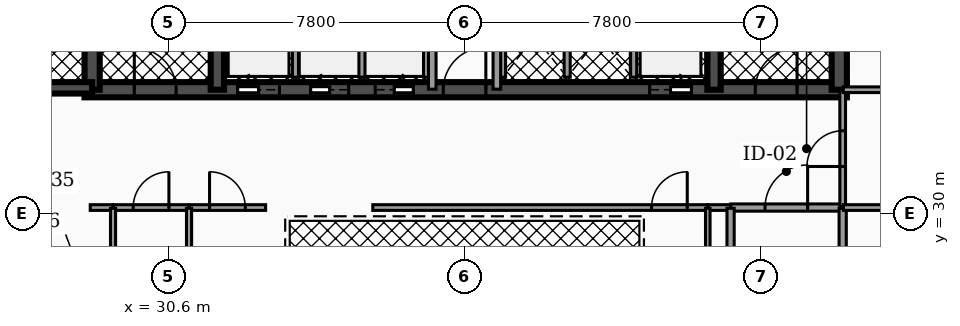
"""IFC4 building model, lengths in metres.
Left out: names, types, materials, properties, quantities, classifications, styles, units other than length and angle.
Written with IfcOpenShell. Run it as: python <this file> out.ifc"""

import sys

from ifc_helpers import new_model, si_unit, direction, frame, frame_2d, origin, place, context, subcontext, project, spatial, rectangle, extrude, element, fill, save


model = new_model("IFC4")
c1 = context("Model", 3, precision=1e-05, world=origin(), true_north=direction((0.0, 1.0)))
c2 = subcontext(c1, "Body", "Model", "MODEL_VIEW")
j1 = project(units=[si_unit("LENGTHUNIT", "METRE"), si_unit("PLANEANGLEUNIT", "RADIAN")], contexts=[c1])
p1 = place(None, origin())
s1 = spatial("IfcSite", under=j1, at=p1, CompositionType="ELEMENT")
p2 = place(p1, origin())
s2 = spatial("IfcBuilding", under=s1, at=p2, CompositionType="ELEMENT")
p3 = place(p2, frame((0.0, 0.0, 179.52)))
s3 = spatial("IfcBuildingStorey", under=s2, at=p3, CompositionType="ELEMENT", Elevation=179.52)
p4 = place(p3, frame((28.4, 33.25, 0.0), z_axis=(0.0, 0.0, 1.0), x_axis=(1.0, 0.0, 0.0)))
e1 = element("IfcWall", 1, at=p4, inside=s3, PredefinedType="SHEAR", context=c2, shape_type="SweptSolid", body=[
    extrude(rectangle(XDim=20.06, YDim=0.4, at=frame_2d((10.03, 0.0))), origin(), (0.0, 0.0, 1.0), 3.5),
])
p5 = place(p4, frame((4.03, 0.0, 0.0)))
e2 = element("IfcOpeningElement", 2, at=p5, cuts=e1, PredefinedType="OPENING", context=c2, shape_type="SweptSolid", body=[
    extrude(rectangle(XDim=1.1, YDim=2.15, at=frame_2d((0.55, 1.075))), frame((0.0, 0.21, 0.0), z_axis=(0.0, -1.0, 0.0), x_axis=(1.0, 0.0, 0.0)), (0.0, 0.0, 1.0), 0.42),
])
p6 = place(p4, frame((14.87, 0.0, 0.0)))
e3 = element("IfcOpeningElement", 3, at=p6, cuts=e1, PredefinedType="OPENING", context=c2, shape_type="SweptSolid", body=[
    extrude(rectangle(XDim=1.1, YDim=2.15, at=frame_2d((0.55, 1.075))), frame((0.0, 0.21, 0.0), z_axis=(0.0, -1.0, 0.0), x_axis=(1.0, 0.0, 0.0)), (0.0, 0.0, 1.0), 0.42),
])
p7 = place(p4, frame((5.95, 0.0, 0.0)))
e4 = element("IfcOpeningElement", 4, at=p7, cuts=e1, PredefinedType="OPENING", context=c2, shape_type="SweptSolid", body=[
    extrude(rectangle(XDim=1.0, YDim=2.1, at=frame_2d((0.5, 1.05))), frame((0.0, 0.21, 0.0), z_axis=(0.0, -1.0, 0.0), x_axis=(1.0, 0.0, 0.0)), (0.0, 0.0, 1.0), 0.42),
])
p8 = place(p4, frame((7.65, 0.0, 0.0)))
e5 = element("IfcOpeningElement", 5, at=p8, cuts=e1, PredefinedType="OPENING", context=c2, shape_type="SweptSolid", body=[
    extrude(rectangle(XDim=1.0, YDim=2.1, at=frame_2d((0.5, 1.05))), frame((0.0, 0.21, 0.0), z_axis=(0.0, -1.0, 0.0), x_axis=(1.0, 0.0, 0.0)), (0.0, 0.0, 1.0), 0.42),
])
p9 = place(p4, frame((1.31, 0.0, 0.0)))
e6 = element("IfcOpeningElement", 6, at=p9, cuts=e1, PredefinedType="OPENING", context=c2, shape_type="SweptSolid", body=[
    extrude(rectangle(XDim=1.1, YDim=2.2, at=frame_2d((0.55, 1.1))), frame((0.0, 0.21, 0.0), z_axis=(0.0, -1.0, 0.0), x_axis=(1.0, 0.0, 0.0)), (0.0, 0.0, 1.0), 0.42),
])
p10 = place(p4, frame((9.44, 0.0, 0.0)))
e7 = element("IfcOpeningElement", 7, at=p10, cuts=e1, PredefinedType="OPENING", context=c2, shape_type="SweptSolid", body=[
    extrude(rectangle(XDim=1.12, YDim=2.05, at=frame_2d((0.56, 1.025))), frame((0.0, 0.21, 0.0), z_axis=(0.0, -1.0, 0.0), x_axis=(1.0, 0.0, 0.0)), (0.0, 0.0, 1.0), 0.42),
])
p11 = place(p4, frame((17.65, 0.0, 0.0)))
e8 = element("IfcOpeningElement", 8, at=p11, cuts=e1, PredefinedType="OPENING", context=c2, shape_type="SweptSolid", body=[
    extrude(rectangle(XDim=1.1, YDim=2.2, at=frame_2d((0.55, 1.1))), frame((0.0, 0.21, 0.0), z_axis=(0.0, -1.0, 0.0), x_axis=(1.0, 0.0, 0.0)), (0.0, 0.0, 1.0), 0.42),
])
p12 = place(p3, frame((28.6, 33.25, 0.0), z_axis=(0.0, 0.0, 1.0), x_axis=(0.0, 1.0, 0.0)))
e9 = element("IfcWall", 9, at=p12, inside=s3, PredefinedType="SHEAR", context=c2, shape_type="SweptSolid", body=[
    extrude(rectangle(XDim=10.2, YDim=0.4, at=frame_2d((5.1, 0.0))), origin(), (0.0, 0.0, 1.0), 3.5),
])
for number, where, z_axis, x_axis in (
    (10, (31.895, 33.25, 0.0), (0.0, 0.0, 1.0), (0.0, 1.0, 0.0)),
    (11, (44.965, 33.25, 0.0), (0.0, 0.0, 1.0), (0.0, 1.0, 0.0)),
):
    element("IfcWall", number, at=place(p3, frame(where, z_axis=z_axis, x_axis=x_axis)), inside=s3, PredefinedType="SHEAR", context=c2, shape_type="SweptSolid", body=[
        extrude(rectangle(XDim=10.2, YDim=0.35, at=frame_2d((5.1, 0.0))), origin(), (0.0, 0.0, 1.0), 3.5),
    ])
p13 = place(p3, frame((48.26, 33.25, 0.0), z_axis=(0.0, 0.0, 1.0), x_axis=(0.0, 1.0, 0.0)))
e12 = element("IfcWall", 12, at=p13, inside=s3, PredefinedType="SHEAR", context=c2, shape_type="SweptSolid", body=[
    extrude(rectangle(XDim=10.2, YDim=0.4, at=frame_2d((5.1, 0.0))), origin(), (0.0, 0.0, 1.0), 3.5),
])
p14 = place(p3, frame((25.08, 33.3, 0.0), z_axis=(0.0, 0.0, 1.0), x_axis=(1.0, 0.0, 0.0)))
e13 = element("IfcWall", 13, at=p14, inside=s3, PredefinedType="SHEAR", context=c2, shape_type="SweptSolid", body=[
    extrude(rectangle(XDim=3.52, YDim=0.3, at=frame_2d((1.76, 0.0))), origin(), (0.0, 0.0, 1.0), 3.5),
])
p15 = place(p14, frame((1.335, 0.0, 0.0)))
e14 = element("IfcOpeningElement", 14, at=p15, cuts=e13, PredefinedType="OPENING", context=c2, shape_type="SweptSolid", body=[
    extrude(rectangle(XDim=0.95, YDim=2.2, at=frame_2d((0.475, 1.1))), frame((0.0, 0.16, 0.0), z_axis=(0.0, -1.0, 0.0), x_axis=(1.0, 0.0, 0.0)), (0.0, 0.0, 1.0), 0.32),
])
for number, where, z_axis, x_axis in (
    (15, (33.95, 33.58, 0.0), (0.0, 0.0, 1.0), (0.0, 1.0, 0.0)),
    (16, (42.85, 33.58, 0.0), (0.0, 0.0, 1.0), (0.0, 1.0, 0.0)),
):
    element("IfcWall", number, at=place(p3, frame(where, z_axis=z_axis, x_axis=x_axis)), inside=s3, PredefinedType="SOLIDWALL", context=c2, shape_type="SweptSolid", body=[
        extrude(rectangle(XDim=2.45, YDim=0.16, at=frame_2d((1.225, 0.0))), origin(), (0.0, 0.0, 1.0), 2.472),
    ])
for number, where, z_axis, x_axis in (
    (17, (35.7, 33.58, 0.0), (0.0, 0.0, 1.0), (0.0, 1.0, 0.0)),
    (18, (37.4, 33.58, 0.0), (0.0, 0.0, 1.0), (0.0, 1.0, 0.0)),
    (19, (39.4, 33.58, 0.0), (0.0, 0.0, 1.0), (0.0, 1.0, 0.0)),
    (20, (41.1, 33.58, 0.0), (0.0, 0.0, 1.0), (0.0, 1.0, 0.0)),
):
    element("IfcWall", number, at=place(p3, frame(where, z_axis=z_axis, x_axis=x_axis)), inside=s3, PredefinedType="SOLIDWALL", context=c2, shape_type="SweptSolid", body=[
        extrude(rectangle(XDim=2.25, YDim=0.16, at=frame_2d((1.125, 0.0))), origin(), (0.0, 0.0, 1.0), 2.472),
    ])
p16 = place(p3, frame((37.55, 33.265, 0.0), z_axis=(0.0, 0.0, 1.0), x_axis=(0.0, 1.0, 0.0)))
e21 = element("IfcWall", 21, at=p16, inside=s3, PredefinedType="PARTITIONING", context=c2, shape_type="SweptSolid", body=[
    extrude(rectangle(XDim=4.265, YDim=0.2, at=frame_2d((2.133, 0.0))), origin(), (0.0, 0.0, 1.0), 2.457),
])
p17 = place(p16, frame((3.093, 0.0, 0.0)))
e22 = element("IfcOpeningElement", 22, at=p17, cuts=e21, PredefinedType="OPENING", context=c2, shape_type="SweptSolid", body=[
    extrude(rectangle(XDim=0.88, YDim=2.05, at=frame_2d((0.44, 1.025))), frame((0.0, 0.11, 0.0), z_axis=(0.0, -1.0, 0.0), x_axis=(1.0, 0.0, 0.0)), (0.0, 0.0, 1.0), 0.22),
])
p18 = place(p3, frame((39.25, 33.265, 0.0), z_axis=(0.0, 0.0, 1.0), x_axis=(0.0, 1.0, 0.0)))
e23 = element("IfcWall", 23, at=p18, inside=s3, PredefinedType="PARTITIONING", context=c2, shape_type="SweptSolid", body=[
    extrude(rectangle(XDim=4.265, YDim=0.2, at=frame_2d((2.133, 0.0))), origin(), (0.0, 0.0, 1.0), 2.457),
])
p19 = place(p18, frame((3.093, 0.0, 0.0)))
e24 = element("IfcOpeningElement", 24, at=p19, cuts=e23, PredefinedType="OPENING", context=c2, shape_type="SweptSolid", body=[
    extrude(rectangle(XDim=0.88, YDim=2.05, at=frame_2d((0.44, 1.025))), frame((0.0, 0.11, 0.0), z_axis=(0.0, -1.0, 0.0), x_axis=(1.0, 0.0, 0.0)), (0.0, 0.0, 1.0), 0.22),
])
p20 = place(p3, frame((45.405, 30.15, 0.0), z_axis=(0.0, 0.0, 1.0), x_axis=(1.0, 0.0, 0.0)))
e25 = element("IfcWall", 25, at=p20, inside=s3, PredefinedType="PARTITIONING", context=c2, shape_type="SweptSolid", body=[
    extrude(rectangle(XDim=2.925, YDim=0.19, at=frame_2d((1.462, 0.0))), origin(), (0.0, 0.0, 1.0), 2.457),
])
p21 = place(p20, frame((0.903, 0.0, 0.0)))
e26 = element("IfcOpeningElement", 26, at=p21, cuts=e25, PredefinedType="OPENING", context=c2, shape_type="SweptSolid", body=[
    extrude(rectangle(XDim=1.12, YDim=2.05, at=frame_2d((0.56, 1.025))), frame((0.0, 0.105, 0.0), z_axis=(0.0, -1.0, 0.0), x_axis=(1.0, 0.0, 0.0)), (0.0, 0.0, 1.0), 0.21),
])
p22 = place(p3, frame((48.35, 30.17, 0.0), z_axis=(0.0, 0.0, 1.0), x_axis=(0.0, 1.0, 0.0)))
e27 = element("IfcWall", 27, at=p22, inside=s3, PredefinedType="PARTITIONING", context=c2, shape_type="SweptSolid", body=[
    extrude(rectangle(XDim=3.06, YDim=0.15, at=frame_2d((1.53, 0.0))), origin(), (0.0, 0.0, 1.0), 2.457),
])
p23 = place(p22, frame((1.06, 0.0, 0.0)))
e28 = element("IfcOpeningElement", 28, at=p23, cuts=e27, PredefinedType="OPENING", context=c2, shape_type="SweptSolid", body=[
    extrude(rectangle(XDim=0.94, YDim=2.05, at=frame_2d((0.47, 1.025))), frame((0.0, 0.085, 0.0), z_axis=(0.0, -1.0, 0.0), x_axis=(1.0, 0.0, 0.0)), (0.0, 0.0, 1.0), 0.17),
])
p24 = place(p3, frame((28.55, 30.15, 0.0), z_axis=(0.0, 0.0, 1.0), x_axis=(1.0, 0.0, 0.0)))
e29 = element("IfcWall", 29, at=p24, inside=s3, PredefinedType="PARTITIONING", context=c2, shape_type="SweptSolid", body=[
    extrude(rectangle(XDim=0.595, YDim=0.15, at=frame_2d((0.297, 0.0))), origin(), (0.0, 0.0, 1.0), 2.457),
])
p25 = place(p3, frame((29.155, 30.15, 0.0), z_axis=(0.0, 0.0, 1.0), x_axis=(1.0, 0.0, 0.0)))
e30 = element("IfcWall", 30, at=p25, inside=s3, PredefinedType="PARTITIONING", context=c2, shape_type="SweptSolid", body=[
    extrude(rectangle(XDim=1.99, YDim=0.15, at=frame_2d((0.995, 0.0))), origin(), (0.0, 0.0, 1.0), 2.457),
])
p26 = place(p25, frame((0.525, 0.0, 0.0)))
e31 = element("IfcOpeningElement", 31, at=p26, cuts=e30, PredefinedType="OPENING", context=c2, shape_type="SweptSolid", body=[
    extrude(rectangle(XDim=0.94, YDim=2.05, at=frame_2d((0.47, 1.025))), frame((0.0, 0.085, 0.0), z_axis=(0.0, -1.0, 0.0), x_axis=(1.0, 0.0, 0.0)), (0.0, 0.0, 1.0), 0.17),
])
p27 = place(p3, frame((31.155, 30.15, 0.0), z_axis=(0.0, 0.0, 1.0), x_axis=(1.0, 0.0, 0.0)))
e32 = element("IfcWall", 32, at=p27, inside=s3, PredefinedType="PARTITIONING", context=c2, shape_type="SweptSolid", body=[
    extrude(rectangle(XDim=2.01, YDim=0.15, at=frame_2d((1.005, 0.0))), origin(), (0.0, 0.0, 1.0), 2.457),
])
p28 = place(p27, frame((0.535, 0.0, 0.0)))
e33 = element("IfcOpeningElement", 33, at=p28, cuts=e32, PredefinedType="OPENING", context=c2, shape_type="SweptSolid", body=[
    extrude(rectangle(XDim=0.94, YDim=2.05, at=frame_2d((0.47, 1.025))), frame((0.0, 0.085, 0.0), z_axis=(0.0, -1.0, 0.0), x_axis=(1.0, 0.0, 0.0)), (0.0, 0.0, 1.0), 0.17),
])
p29 = place(p3, frame((35.985, 30.15, 0.0), z_axis=(0.0, 0.0, 1.0), x_axis=(1.0, 0.0, 0.0)))
e34 = element("IfcWall", 34, at=p29, inside=s3, PredefinedType="PARTITIONING", context=c2, shape_type="SweptSolid", body=[
    extrude(rectangle(XDim=8.81, YDim=0.15, at=frame_2d((4.405, 0.0))), origin(), (0.0, 0.0, 1.0), 2.457),
])
p30 = place(p29, frame((7.335, 0.0, 0.0)))
e35 = element("IfcOpeningElement", 35, at=p30, cuts=e34, PredefinedType="OPENING", context=c2, shape_type="SweptSolid", body=[
    extrude(rectangle(XDim=0.94, YDim=2.05, at=frame_2d((0.47, 1.025))), frame((0.0, 0.085, 0.0), z_axis=(0.0, -1.0, 0.0), x_axis=(1.0, 0.0, 0.0)), (0.0, 0.0, 1.0), 0.17),
])
p31 = place(p3, frame((44.805, 30.15, 0.0), z_axis=(0.0, 0.0, 1.0), x_axis=(1.0, 0.0, 0.0)))
e36 = element("IfcWall", 36, at=p31, inside=s3, PredefinedType="PARTITIONING", context=c2, shape_type="SweptSolid", body=[
    extrude(rectangle(XDim=0.59, YDim=0.15, at=frame_2d((0.295, 0.0))), origin(), (0.0, 0.0, 1.0), 2.457),
])
for number, where, z_axis, x_axis in (
    (37, (45.4, 27.37, 0.0), (0.0, 0.0, 1.0), (0.0, 1.0, 0.0)),
    (38, (48.35, 27.37, 0.0), (0.0, 0.0, 1.0), (0.0, 1.0, 0.0)),
):
    element("IfcWall", number, at=place(p3, frame(where, z_axis=z_axis, x_axis=x_axis)), inside=s3, PredefinedType="PARTITIONING", context=c2, shape_type="SweptSolid", body=[
        extrude(rectangle(XDim=2.76, YDim=0.19, at=frame_2d((1.38, 0.0))), origin(), (0.0, 0.0, 1.0), 2.457),
    ])
p32 = place(p3, frame((48.37, 30.15, 0.0), z_axis=(0.0, 0.0, 1.0), x_axis=(1.0, 0.0, 0.0)))
e39 = element("IfcWall", 39, at=p32, inside=s3, PredefinedType="PARTITIONING", context=c2, shape_type="SweptSolid", body=[
    extrude(rectangle(XDim=3.26, YDim=0.15, at=frame_2d((1.63, 0.0))), origin(), (0.0, 0.0, 1.0), 2.457),
])
p33 = place(p32, frame((1.16, 0.0, 0.0)))
e40 = element("IfcOpeningElement", 40, at=p33, cuts=e39, PredefinedType="OPENING", context=c2, shape_type="SweptSolid", body=[
    extrude(rectangle(XDim=0.94, YDim=2.05, at=frame_2d((0.47, 1.025))), frame((0.0, 0.085, 0.0), z_axis=(0.0, -1.0, 0.0), x_axis=(1.0, 0.0, 0.0)), (0.0, 0.0, 1.0), 0.17),
])
p34 = place(p3, frame((48.365, 33.25, 0.0), z_axis=(0.0, 0.0, 1.0), x_axis=(1.0, 0.0, 0.0)))
e41 = element("IfcWall", 41, at=p34, inside=s3, PredefinedType="PARTITIONING", context=c2, shape_type="SweptSolid", body=[
    extrude(rectangle(XDim=3.27, YDim=0.15, at=frame_2d((1.635, 0.0))), origin(), (0.0, 0.0, 1.0), 2.457),
])
p35 = place(p34, frame((1.165, 0.0, 0.0)))
e42 = element("IfcOpeningElement", 42, at=p35, cuts=e41, PredefinedType="OPENING", context=c2, shape_type="SweptSolid", body=[
    extrude(rectangle(XDim=0.94, YDim=2.05, at=frame_2d((0.47, 1.025))), frame((0.0, 0.085, 0.0), z_axis=(0.0, -1.0, 0.0), x_axis=(1.0, 0.0, 0.0)), (0.0, 0.0, 1.0), 0.17),
])
p36 = place(p3, frame((29.15, 27.17, 0.0), z_axis=(0.0, 0.0, 1.0), x_axis=(0.0, 1.0, 0.0)))
e43 = element("IfcWall", 43, at=p36, inside=s3, PredefinedType="PARTITIONING", context=c2, shape_type="SweptSolid", body=[
    extrude(rectangle(XDim=2.96, YDim=0.135, at=frame_2d((1.48, 0.0))), origin(), (0.0, 0.0, 1.0), 2.457),
])
p37 = place(p36, frame((1.05, 0.0, 0.0)))
e44 = element("IfcOpeningElement", 44, at=p37, cuts=e43, PredefinedType="OPENING", context=c2, shape_type="SweptSolid", body=[
    extrude(rectangle(XDim=0.86, YDim=2.05, at=frame_2d((0.43, 1.025))), frame((0.0, 0.077, 0.0), z_axis=(0.0, -1.0, 0.0), x_axis=(1.0, 0.0, 0.0)), (0.0, 0.0, 1.0), 0.155),
])
p38 = place(p3, frame((31.15, 27.17, 0.0), z_axis=(0.0, 0.0, 1.0), x_axis=(0.0, 1.0, 0.0)))
e45 = element("IfcWall", 45, at=p38, inside=s3, PredefinedType="PARTITIONING", context=c2, shape_type="SweptSolid", body=[
    extrude(rectangle(XDim=2.96, YDim=0.135, at=frame_2d((1.48, 0.0))), origin(), (0.0, 0.0, 1.0), 2.457),
])
p39 = place(p3, frame((44.8, 23.903, 0.0), z_axis=(0.0, 0.0, 1.0), x_axis=(0.0, 1.0, 0.0)))
e46 = element("IfcWall", 46, at=p39, inside=s3, PredefinedType="PARTITIONING", context=c2, shape_type="SweptSolid", body=[
    extrude(rectangle(XDim=6.227, YDim=0.12, at=frame_2d((3.114, 0.0))), origin(), (0.0, 0.0, 1.0), 2.457),
])
p40 = place(p5, origin())
e47 = element("IfcDoor", 47, at=p40, inside=s3, OperationType="SLIDING_TO_LEFT", PredefinedType="DOOR", context=c2, shape_type="SweptSolid", body=[
    extrude(rectangle(XDim=1.1, YDim=2.15, at=frame_2d((0.55, 1.075))), frame((0.0, 0.025, 0.0), z_axis=(0.0, -1.0, 0.0), x_axis=(1.0, 0.0, 0.0)), (0.0, 0.0, 1.0), 0.05),
])
fill(e2, e47)
p41 = place(p6, origin())
e48 = element("IfcDoor", 48, at=p41, inside=s3, OperationType="SLIDING_TO_RIGHT", PredefinedType="DOOR", context=c2, shape_type="SweptSolid", body=[
    extrude(rectangle(XDim=1.1, YDim=2.15, at=frame_2d((0.55, 1.075))), frame((0.0, 0.025, 0.0), z_axis=(0.0, -1.0, 0.0), x_axis=(1.0, 0.0, 0.0)), (0.0, 0.0, 1.0), 0.05),
])
fill(e3, e48)
p42 = place(p7, origin())
e49 = element("IfcDoor", 49, at=p42, inside=s3, OperationType="SLIDING_TO_LEFT", PredefinedType="DOOR", context=c2, shape_type="SweptSolid", body=[
    extrude(rectangle(XDim=1.0, YDim=2.1, at=frame_2d((0.5, 1.05))), frame((0.0, 0.025, 0.0), z_axis=(0.0, -1.0, 0.0), x_axis=(1.0, 0.0, 0.0)), (0.0, 0.0, 1.0), 0.05),
])
fill(e4, e49)
p43 = place(p8, origin())
e50 = element("IfcDoor", 50, at=p43, inside=s3, OperationType="SLIDING_TO_RIGHT", PredefinedType="DOOR", context=c2, shape_type="SweptSolid", body=[
    extrude(rectangle(XDim=1.0, YDim=2.1, at=frame_2d((0.5, 1.05))), frame((0.0, 0.025, 0.0), z_axis=(0.0, -1.0, 0.0), x_axis=(1.0, 0.0, 0.0)), (0.0, 0.0, 1.0), 0.05),
])
fill(e5, e50)
p44 = place(p9, origin())
e51 = element("IfcDoor", 51, at=p44, inside=s3, OperationType="SINGLE_SWING_LEFT", PredefinedType="DOOR", context=c2, shape_type="SweptSolid", body=[
    extrude(rectangle(XDim=1.1, YDim=2.2, at=frame_2d((0.55, 1.1))), frame((0.0, 0.025, 0.0), z_axis=(0.0, -1.0, 0.0), x_axis=(1.0, 0.0, 0.0)), (0.0, 0.0, 1.0), 0.05),
])
fill(e6, e51)
p45 = place(p10, origin())
e52 = element("IfcDoor", 52, at=p45, inside=s3, OperationType="SINGLE_SWING_RIGHT", PredefinedType="DOOR", context=c2, shape_type="SweptSolid", body=[
    extrude(rectangle(XDim=1.12, YDim=2.05, at=frame_2d((0.56, 1.025))), frame((0.0, 0.025, 0.0), z_axis=(0.0, -1.0, 0.0), x_axis=(1.0, 0.0, 0.0)), (0.0, 0.0, 1.0), 0.05),
])
fill(e7, e52)
p46 = place(p11, origin())
e53 = element("IfcDoor", 53, at=p46, inside=s3, OperationType="SINGLE_SWING_RIGHT", PredefinedType="DOOR", context=c2, shape_type="SweptSolid", body=[
    extrude(rectangle(XDim=1.1, YDim=2.2, at=frame_2d((0.55, 1.1))), frame((0.0, 0.025, 0.0), z_axis=(0.0, -1.0, 0.0), x_axis=(1.0, 0.0, 0.0)), (0.0, 0.0, 1.0), 0.05),
])
fill(e8, e53)
p47 = place(p21, origin())
e54 = element("IfcDoor", 54, at=p47, inside=s3, OperationType="SINGLE_SWING_RIGHT", PredefinedType="DOOR", context=c2, shape_type="SweptSolid", body=[
    extrude(rectangle(XDim=1.12, YDim=2.05, at=frame_2d((0.56, 1.025))), frame((0.0, 0.025, 0.0), z_axis=(0.0, -1.0, 0.0), x_axis=(1.0, 0.0, 0.0)), (0.0, 0.0, 1.0), 0.05),
])
fill(e26, e54)
p48 = place(p23, origin())
e55 = element("IfcDoor", 55, at=p48, inside=s3, OperationType="SINGLE_SWING_LEFT", PredefinedType="DOOR", context=c2, shape_type="SweptSolid", body=[
    extrude(rectangle(XDim=0.94, YDim=2.05, at=frame_2d((0.47, 1.025))), frame((0.0, 0.025, 0.0), z_axis=(0.0, -1.0, 0.0), x_axis=(1.0, 0.0, 0.0)), (0.0, 0.0, 1.0), 0.05),
])
fill(e28, e55)
p49 = place(p26, origin())
e56 = element("IfcDoor", 56, at=p49, inside=s3, OperationType="SINGLE_SWING_RIGHT", PredefinedType="DOOR", context=c2, shape_type="SweptSolid", body=[
    extrude(rectangle(XDim=0.94, YDim=2.05, at=frame_2d((0.47, 1.025))), frame((0.0, 0.025, 0.0), z_axis=(0.0, -1.0, 0.0), x_axis=(1.0, 0.0, 0.0)), (0.0, 0.0, 1.0), 0.05),
])
fill(e31, e56)
p50 = place(p28, origin())
e57 = element("IfcDoor", 57, at=p50, inside=s3, OperationType="SINGLE_SWING_LEFT", PredefinedType="DOOR", context=c2, shape_type="SweptSolid", body=[
    extrude(rectangle(XDim=0.94, YDim=2.05, at=frame_2d((0.47, 1.025))), frame((0.0, 0.025, 0.0), z_axis=(0.0, -1.0, 0.0), x_axis=(1.0, 0.0, 0.0)), (0.0, 0.0, 1.0), 0.05),
])
fill(e33, e57)
p51 = place(p30, origin())
e58 = element("IfcDoor", 58, at=p51, inside=s3, OperationType="SINGLE_SWING_RIGHT", PredefinedType="DOOR", context=c2, shape_type="SweptSolid", body=[
    extrude(rectangle(XDim=0.94, YDim=2.05, at=frame_2d((0.47, 1.025))), frame((0.0, 0.025, 0.0), z_axis=(0.0, -1.0, 0.0), x_axis=(1.0, 0.0, 0.0)), (0.0, 0.0, 1.0), 0.05),
])
fill(e35, e58)
save(model, sys.argv[1])
